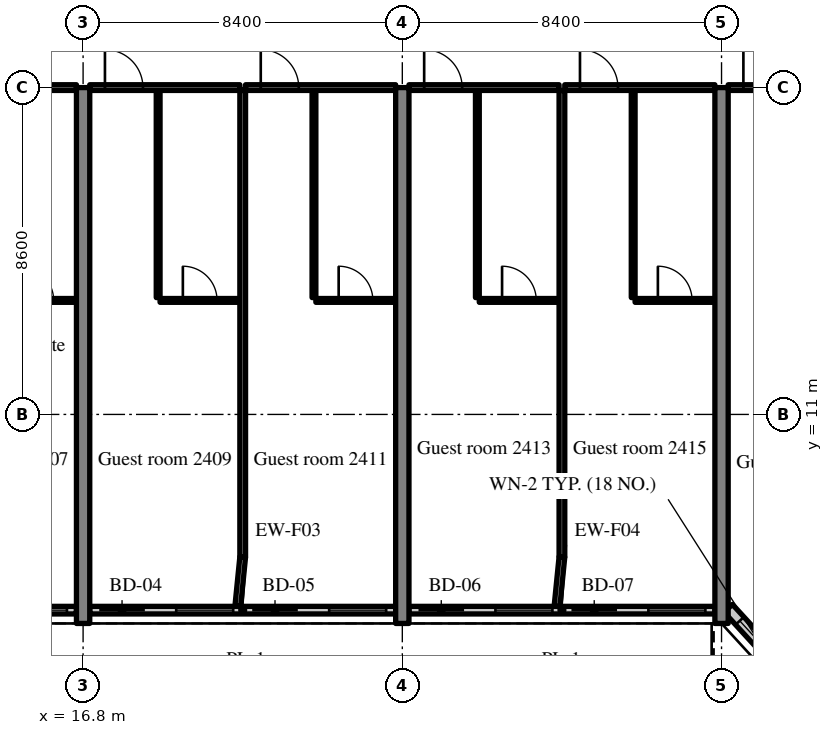
"""IFC4 building model, lengths in metres.
Left out: names, types, materials, properties, quantities, classifications, styles, units other than length and angle.
Written with IfcOpenShell. Run it as: python <this file> out.ifc"""

import sys

from ifc_helpers import new_model, si_unit, direction, frame, frame_2d, origin, place, context, subcontext, project, spatial, rectangle, extrude, source, transform, mapped, element, fill, save


model = new_model("IFC4")
c1 = context("Model", 3, precision=1e-05, world=origin(), true_north=direction((0.0, 1.0)))
c2 = subcontext(c1, "Body", "Model", "MODEL_VIEW")
j1 = project(units=[si_unit("LENGTHUNIT", "METRE"), si_unit("PLANEANGLEUNIT", "RADIAN")], contexts=[c1])
p1 = place(None, origin())
s1 = spatial("IfcSite", under=j1, at=p1, CompositionType="ELEMENT")
p2 = place(p1, origin())
s2 = spatial("IfcBuilding", under=s1, at=p2, CompositionType="ELEMENT")
p3 = place(p2, frame((0.0, 0.0, 102.8)))
s3 = spatial("IfcBuildingStorey", under=s2, at=p3, CompositionType="ELEMENT", Elevation=102.8)
m1 = source(origin(), c2, "Body", "SweptSolid", [
    extrude(rectangle(XDim=14.1, YDim=0.35, at=frame_2d((7.05, 0.0))), origin(), (0.0, 0.0, 1.0), 3.52),
])
for number, where, z_axis, x_axis in (
    (1, (16.8, 5.5, 0.0), (0.0, 0.0, 1.0), (0.0, 1.0, 0.0)),
    (2, (25.2, 5.5, 0.0), (0.0, 0.0, 1.0), (0.0, 1.0, 0.0)),
    (3, (33.6, 5.5, 0.0), (0.0, 0.0, 1.0), (0.0, 1.0, 0.0)),
):
    element("IfcWall", number, at=place(p3, frame(where, z_axis=z_axis, x_axis=x_axis)), inside=s3, PredefinedType="SHEAR", context=c2, shape_type="MappedRepresentation", body=[
        mapped(m1, transform((0.0, 0.0, 0.0), scale=1.0)),
    ])
m2 = source(origin(), c2, "Body", "SweptSolid", [
    extrude(rectangle(XDim=8.05, YDim=0.2, at=frame_2d((4.025, 0.0))), origin(), (0.0, 0.0, 1.0), 2.82),
])
p4 = place(p3, frame((8.575, 5.85, 0.0), z_axis=(0.0, 0.0, 1.0), x_axis=(1.0, 0.0, 0.0)))
e4 = element("IfcWall", 4, at=p4, inside=s3, PredefinedType="SOLIDWALL", context=c2, shape_type="MappedRepresentation", body=[
    mapped(m2, transform((0.0, 0.0, 0.0), scale=1.0)),
])
m3 = source(origin(), c2, "Body", "SweptSolid", [
    extrude(rectangle(XDim=1.2, YDim=2.4, at=frame_2d((0.6, 1.2))), frame((0.0, 0.11, 0.0), z_axis=(0.0, -1.0, 0.0), x_axis=(1.0, 0.0, 0.0)), (0.0, 0.0, 1.0), 0.22),
])
p5 = place(p4, frame((0.25, 0.0, 0.0)))
e5 = element("IfcOpeningElement", 5, at=p5, cuts=e4, PredefinedType="OPENING", context=c2, shape_type="MappedRepresentation", body=[
    mapped(m3, transform((0.0, 0.0, 0.0), scale=1.0)),
])
m4 = source(origin(), c2, "Body", "SweptSolid", [
    extrude(rectangle(XDim=1.5, YDim=1.5, at=frame_2d((0.75, 0.75))), frame((0.0, 0.11, 0.0), z_axis=(0.0, -1.0, 0.0), x_axis=(1.0, 0.0, 0.0)), (0.0, 0.0, 1.0), 0.22),
])
p6 = place(p4, frame((2.275, 0.0, 0.9)))
e6 = element("IfcOpeningElement", 6, at=p6, cuts=e4, PredefinedType="OPENING", context=c2, shape_type="MappedRepresentation", body=[
    mapped(m4, transform((0.0, 0.0, 0.0), scale=1.0)),
])
p7 = place(p4, frame((4.275, 0.0, 0.0)))
e7 = element("IfcOpeningElement", 7, at=p7, cuts=e4, PredefinedType="OPENING", context=c2, shape_type="MappedRepresentation", body=[
    mapped(m3, transform((0.0, 0.0, 0.0), scale=1.0)),
])
p8 = place(p4, frame((6.3, 0.0, 0.9)))
e8 = element("IfcOpeningElement", 8, at=p8, cuts=e4, PredefinedType="OPENING", context=c2, shape_type="MappedRepresentation", body=[
    mapped(m4, transform((0.0, 0.0, 0.0), scale=1.0)),
])
m5 = source(origin(), c2, "Body", "SweptSolid", [
    extrude(rectangle(XDim=8.05, YDim=0.2, at=frame_2d((4.025, 0.0))), origin(), (0.0, 0.0, 1.0), 2.82),
])
p9 = place(p3, frame((16.975, 5.85, 0.0), z_axis=(0.0, 0.0, 1.0), x_axis=(1.0, 0.0, 0.0)))
e9 = element("IfcWall", 9, at=p9, inside=s3, PredefinedType="SOLIDWALL", context=c2, shape_type="MappedRepresentation", body=[
    mapped(m5, transform((0.0, 0.0, 0.0), scale=1.0)),
])
p10 = place(p9, frame((0.25, 0.0, 0.0)))
e10 = element("IfcOpeningElement", 10, at=p10, cuts=e9, PredefinedType="OPENING", context=c2, shape_type="MappedRepresentation", body=[
    mapped(m3, transform((0.0, 0.0, 0.0), scale=1.0)),
])
p11 = place(p9, frame((2.275, 0.0, 0.9)))
e11 = element("IfcOpeningElement", 11, at=p11, cuts=e9, PredefinedType="OPENING", context=c2, shape_type="MappedRepresentation", body=[
    mapped(m4, transform((0.0, 0.0, 0.0), scale=1.0)),
])
p12 = place(p9, frame((4.275, 0.0, 0.0)))
e12 = element("IfcOpeningElement", 12, at=p12, cuts=e9, PredefinedType="OPENING", context=c2, shape_type="MappedRepresentation", body=[
    mapped(m3, transform((0.0, 0.0, 0.0), scale=1.0)),
])
p13 = place(p9, frame((6.3, 0.0, 0.9)))
e13 = element("IfcOpeningElement", 13, at=p13, cuts=e9, PredefinedType="OPENING", context=c2, shape_type="MappedRepresentation", body=[
    mapped(m4, transform((0.0, 0.0, 0.0), scale=1.0)),
])
p14 = place(p3, frame((25.375, 5.85, 0.0), z_axis=(0.0, 0.0, 1.0), x_axis=(1.0, 0.0, 0.0)))
e14 = element("IfcWall", 14, at=p14, inside=s3, PredefinedType="SOLIDWALL", context=c2, shape_type="MappedRepresentation", body=[
    mapped(m2, transform((0.0, 0.0, 0.0), scale=1.0)),
])
p15 = place(p14, frame((0.25, 0.0, 0.0)))
e15 = element("IfcOpeningElement", 15, at=p15, cuts=e14, PredefinedType="OPENING", context=c2, shape_type="MappedRepresentation", body=[
    mapped(m3, transform((0.0, 0.0, 0.0), scale=1.0)),
])
p16 = place(p14, frame((2.275, 0.0, 0.9)))
e16 = element("IfcOpeningElement", 16, at=p16, cuts=e14, PredefinedType="OPENING", context=c2, shape_type="MappedRepresentation", body=[
    mapped(m4, transform((0.0, 0.0, 0.0), scale=1.0)),
])
p17 = place(p14, frame((4.275, 0.0, 0.0)))
e17 = element("IfcOpeningElement", 17, at=p17, cuts=e14, PredefinedType="OPENING", context=c2, shape_type="MappedRepresentation", body=[
    mapped(m3, transform((0.0, 0.0, 0.0), scale=1.0)),
])
p18 = place(p14, frame((6.3, 0.0, 0.9)))
e18 = element("IfcOpeningElement", 18, at=p18, cuts=e14, PredefinedType="OPENING", context=c2, shape_type="MappedRepresentation", body=[
    mapped(m4, transform((0.0, 0.0, 0.0), scale=1.0)),
])
m6 = source(origin(), c2, "Body", "SweptSolid", [
    extrude(rectangle(XDim=2.398, YDim=0.3, at=frame_2d((1.199, 0.0))), origin(), (0.0, 0.0, 1.0), 3.52),
])
p19 = place(p3, frame((33.776, 5.9, 0.0), z_axis=(0.0, 0.0, 1.0), x_axis=(0.675374189419, -0.737475222815, 0.0)))
e19 = element("IfcWall", 19, at=p19, inside=s3, PredefinedType="SOLIDWALL", context=c2, shape_type="MappedRepresentation", body=[
    mapped(m6, transform((0.0, 0.0, 0.0), scale=1.0)),
])
m7 = source(origin(), c2, "Body", "SweptSolid", [
    extrude(rectangle(XDim=1.5, YDim=2.0, at=frame_2d((0.75, 1.0))), frame((0.0, 0.16, 0.0), z_axis=(0.0, -1.0, 0.0), x_axis=(1.0, 0.0, 0.0)), (0.0, 0.0, 1.0), 0.32),
])
p20 = place(p19, frame((0.449, 0.0, 0.9)))
e20 = element("IfcOpeningElement", 20, at=p20, cuts=e19, PredefinedType="OPENING", context=c2, shape_type="MappedRepresentation", body=[
    mapped(m7, transform((0.0, 0.0, 0.0), scale=1.0)),
])
m8 = source(origin(), c2, "Body", "SweptSolid", [
    extrude(rectangle(XDim=2.1, YDim=0.1, at=frame_2d((1.05, 0.0))), origin(), (0.0, 0.0, 1.0), 3.52),
])
p21 = place(p3, frame((14.525, 14.0, 0.0), z_axis=(0.0, 0.0, 1.0), x_axis=(1.0, 0.0, 0.0)))
e21 = element("IfcWall", 21, at=p21, inside=s3, PredefinedType="PARTITIONING", context=c2, shape_type="MappedRepresentation", body=[
    mapped(m8, transform((0.0, 0.0, 0.0), scale=1.0)),
])
m9 = source(origin(), c2, "Body", "SweptSolid", [
    extrude(rectangle(XDim=0.9, YDim=2.1, at=frame_2d((0.45, 1.05))), frame((0.0, 0.06, 0.0), z_axis=(0.0, -1.0, 0.0), x_axis=(1.0, 0.0, 0.0)), (0.0, 0.0, 1.0), 0.12),
])
p22 = place(p21, frame((0.6, 0.0, 0.0)))
e22 = element("IfcOpeningElement", 22, at=p22, cuts=e21, PredefinedType="OPENING", context=c2, shape_type="MappedRepresentation", body=[
    mapped(m9, transform((0.0, 0.0, 0.0), scale=1.0)),
])
m10 = source(origin(), c2, "Body", "SweptSolid", [
    extrude(rectangle(XDim=3.95, YDim=0.15, at=frame_2d((1.975, 0.0))), origin(), (0.0, 0.0, 1.0), 2.82),
])
p23 = place(p3, frame((12.675, 19.6, 0.0), z_axis=(0.0, 0.0, 1.0), x_axis=(1.0, 0.0, 0.0)))
e23 = element("IfcWall", 23, at=p23, inside=s3, PredefinedType="PARTITIONING", context=c2, shape_type="MappedRepresentation", body=[
    mapped(m10, transform((0.0, 0.0, 0.0), scale=1.0)),
])
m11 = source(origin(), c2, "Body", "SweptSolid", [
    extrude(rectangle(XDim=1.0, YDim=2.1, at=frame_2d((0.5, 1.05))), frame((0.0, 0.085, 0.0), z_axis=(0.0, -1.0, 0.0), x_axis=(1.0, 0.0, 0.0)), (0.0, 0.0, 1.0), 0.17),
])
p24 = place(p23, frame((0.4, 0.0, 0.0)))
e24 = element("IfcOpeningElement", 24, at=p24, cuts=e23, PredefinedType="OPENING", context=c2, shape_type="MappedRepresentation", body=[
    mapped(m11, transform((0.0, 0.0, 0.0), scale=1.0)),
])
m12 = source(origin(), c2, "Body", "SweptSolid", [
    extrude(rectangle(XDim=5.45, YDim=0.1, at=frame_2d((2.725, 0.0))), origin(), (0.0, 0.0, 1.0), 3.52),
])
p25 = place(p3, frame((18.775, 14.075, 0.0), z_axis=(0.0, 0.0, 1.0), x_axis=(0.0, 1.0, 0.0)))
e25 = element("IfcWall", 25, at=p25, inside=s3, PredefinedType="PARTITIONING", context=c2, shape_type="MappedRepresentation", body=[
    mapped(m12, transform((0.0, 0.0, 0.0), scale=1.0)),
])
p26 = place(p3, frame((18.825, 14.0, 0.0), z_axis=(0.0, 0.0, 1.0), x_axis=(1.0, 0.0, 0.0)))
e26 = element("IfcWall", 26, at=p26, inside=s3, PredefinedType="PARTITIONING", context=c2, shape_type="MappedRepresentation", body=[
    mapped(m8, transform((0.0, 0.0, 0.0), scale=1.0)),
])
p27 = place(p26, frame((0.6, 0.0, 0.0)))
e27 = element("IfcOpeningElement", 27, at=p27, cuts=e26, PredefinedType="OPENING", context=c2, shape_type="MappedRepresentation", body=[
    mapped(m9, transform((0.0, 0.0, 0.0), scale=1.0)),
])
p28 = place(p3, frame((16.975, 19.6, 0.0), z_axis=(0.0, 0.0, 1.0), x_axis=(1.0, 0.0, 0.0)))
e28 = element("IfcWall", 28, at=p28, inside=s3, PredefinedType="PARTITIONING", context=c2, shape_type="MappedRepresentation", body=[
    mapped(m10, transform((0.0, 0.0, 0.0), scale=1.0)),
])
p29 = place(p28, frame((0.4, 0.0, 0.0)))
e29 = element("IfcOpeningElement", 29, at=p29, cuts=e28, PredefinedType="OPENING", context=c2, shape_type="MappedRepresentation", body=[
    mapped(m11, transform((0.0, 0.0, 0.0), scale=1.0)),
])
p30 = place(p3, frame((22.875, 14.075, 0.0), z_axis=(0.0, 0.0, 1.0), x_axis=(0.0, 1.0, 0.0)))
e30 = element("IfcWall", 30, at=p30, inside=s3, PredefinedType="PARTITIONING", context=c2, shape_type="MappedRepresentation", body=[
    mapped(m12, transform((0.0, 0.0, 0.0), scale=1.0)),
])
m13 = source(origin(), c2, "Body", "SweptSolid", [
    extrude(rectangle(XDim=2.1, YDim=0.1, at=frame_2d((1.05, 0.0))), origin(), (0.0, 0.0, 1.0), 3.52),
])
p31 = place(p3, frame((22.925, 14.0, 0.0), z_axis=(0.0, 0.0, 1.0), x_axis=(1.0, 0.0, 0.0)))
e31 = element("IfcWall", 31, at=p31, inside=s3, PredefinedType="PARTITIONING", context=c2, shape_type="MappedRepresentation", body=[
    mapped(m13, transform((0.0, 0.0, 0.0), scale=1.0)),
])
p32 = place(p31, frame((0.6, 0.0, 0.0)))
e32 = element("IfcOpeningElement", 32, at=p32, cuts=e31, PredefinedType="OPENING", context=c2, shape_type="MappedRepresentation", body=[
    mapped(m9, transform((0.0, 0.0, 0.0), scale=1.0)),
])
p33 = place(p3, frame((21.075, 19.6, 0.0), z_axis=(0.0, 0.0, 1.0), x_axis=(1.0, 0.0, 0.0)))
e33 = element("IfcWall", 33, at=p33, inside=s3, PredefinedType="PARTITIONING", context=c2, shape_type="MappedRepresentation", body=[
    mapped(m10, transform((0.0, 0.0, 0.0), scale=1.0)),
])
p34 = place(p33, frame((0.4, 0.0, 0.0)))
e34 = element("IfcOpeningElement", 34, at=p34, cuts=e33, PredefinedType="OPENING", context=c2, shape_type="MappedRepresentation", body=[
    mapped(m11, transform((0.0, 0.0, 0.0), scale=1.0)),
])
m14 = source(origin(), c2, "Body", "SweptSolid", [
    extrude(rectangle(XDim=12.275, YDim=0.15, at=frame_2d((6.137, 0.0))), origin(), (0.0, 0.0, 1.0), 3.52),
])
p35 = place(p3, frame((21.0, 7.25, 0.0), z_axis=(0.0, 0.0, 1.0), x_axis=(0.0, 1.0, 0.0)))
e35 = element("IfcWall", 35, at=p35, inside=s3, PredefinedType="PARTITIONING", context=c2, shape_type="MappedRepresentation", body=[
    mapped(m14, transform((0.0, 0.0, 0.0), scale=1.0)),
])
p36 = place(p3, frame((27.175, 14.075, 0.0), z_axis=(0.0, 0.0, 1.0), x_axis=(0.0, 1.0, 0.0)))
e36 = element("IfcWall", 36, at=p36, inside=s3, PredefinedType="PARTITIONING", context=c2, shape_type="MappedRepresentation", body=[
    mapped(m12, transform((0.0, 0.0, 0.0), scale=1.0)),
])
p37 = place(p3, frame((27.225, 14.0, 0.0), z_axis=(0.0, 0.0, 1.0), x_axis=(1.0, 0.0, 0.0)))
e37 = element("IfcWall", 37, at=p37, inside=s3, PredefinedType="PARTITIONING", context=c2, shape_type="MappedRepresentation", body=[
    mapped(m13, transform((0.0, 0.0, 0.0), scale=1.0)),
])
p38 = place(p37, frame((0.6, 0.0, 0.0)))
e38 = element("IfcOpeningElement", 38, at=p38, cuts=e37, PredefinedType="OPENING", context=c2, shape_type="MappedRepresentation", body=[
    mapped(m9, transform((0.0, 0.0, 0.0), scale=1.0)),
])
p39 = place(p3, frame((25.375, 19.6, 0.0), z_axis=(0.0, 0.0, 1.0), x_axis=(1.0, 0.0, 0.0)))
e39 = element("IfcWall", 39, at=p39, inside=s3, PredefinedType="PARTITIONING", context=c2, shape_type="MappedRepresentation", body=[
    mapped(m10, transform((0.0, 0.0, 0.0), scale=1.0)),
])
p40 = place(p39, frame((0.4, 0.0, 0.0)))
e40 = element("IfcOpeningElement", 40, at=p40, cuts=e39, PredefinedType="OPENING", context=c2, shape_type="MappedRepresentation", body=[
    mapped(m11, transform((0.0, 0.0, 0.0), scale=1.0)),
])
p41 = place(p3, frame((31.275, 14.075, 0.0), z_axis=(0.0, 0.0, 1.0), x_axis=(0.0, 1.0, 0.0)))
e41 = element("IfcWall", 41, at=p41, inside=s3, PredefinedType="PARTITIONING", context=c2, shape_type="MappedRepresentation", body=[
    mapped(m12, transform((0.0, 0.0, 0.0), scale=1.0)),
])
p42 = place(p3, frame((31.325, 14.0, 0.0), z_axis=(0.0, 0.0, 1.0), x_axis=(1.0, 0.0, 0.0)))
e42 = element("IfcWall", 42, at=p42, inside=s3, PredefinedType="PARTITIONING", context=c2, shape_type="MappedRepresentation", body=[
    mapped(m8, transform((0.0, 0.0, 0.0), scale=1.0)),
])
p43 = place(p42, frame((0.6, 0.0, 0.0)))
e43 = element("IfcOpeningElement", 43, at=p43, cuts=e42, PredefinedType="OPENING", context=c2, shape_type="MappedRepresentation", body=[
    mapped(m9, transform((0.0, 0.0, 0.0), scale=1.0)),
])
p44 = place(p3, frame((29.475, 19.6, 0.0), z_axis=(0.0, 0.0, 1.0), x_axis=(1.0, 0.0, 0.0)))
e44 = element("IfcWall", 44, at=p44, inside=s3, PredefinedType="PARTITIONING", context=c2, shape_type="MappedRepresentation", body=[
    mapped(m10, transform((0.0, 0.0, 0.0), scale=1.0)),
])
p45 = place(p44, frame((0.4, 0.0, 0.0)))
e45 = element("IfcOpeningElement", 45, at=p45, cuts=e44, PredefinedType="OPENING", context=c2, shape_type="MappedRepresentation", body=[
    mapped(m11, transform((0.0, 0.0, 0.0), scale=1.0)),
])
p46 = place(p3, frame((29.4, 7.25, 0.0), z_axis=(0.0, 0.0, 1.0), x_axis=(0.0, 1.0, 0.0)))
e46 = element("IfcWall", 46, at=p46, inside=s3, PredefinedType="PARTITIONING", context=c2, shape_type="MappedRepresentation", body=[
    mapped(m14, transform((0.0, 0.0, 0.0), scale=1.0)),
])
m15 = source(origin(), c2, "Body", "SweptSolid", [
    extrude(rectangle(XDim=3.95, YDim=0.15, at=frame_2d((1.975, 0.0))), origin(), (0.0, 0.0, 1.0), 2.82),
])
p47 = place(p3, frame((33.775, 19.6, 0.0), z_axis=(0.0, 0.0, 1.0), x_axis=(1.0, 0.0, 0.0)))
e47 = element("IfcWall", 47, at=p47, inside=s3, PredefinedType="PARTITIONING", context=c2, shape_type="MappedRepresentation", body=[
    mapped(m15, transform((0.0, 0.0, 0.0), scale=1.0)),
])
p48 = place(p47, frame((0.4, 0.0, 0.0)))
e48 = element("IfcOpeningElement", 48, at=p48, cuts=e47, PredefinedType="OPENING", context=c2, shape_type="MappedRepresentation", body=[
    mapped(m11, transform((0.0, 0.0, 0.0), scale=1.0)),
])
m16 = source(origin(), c2, "Body", "SweptSolid", [
    extrude(rectangle(XDim=1.307, YDim=0.15, at=frame_2d((0.653, 0.0))), origin(), (0.0, 0.0, 1.0), 3.52),
])
for number, where, z_axis, x_axis in (
    (49, (20.87, 5.95, 0.0), (0.0, 0.0, 1.0), (0.099, 0.995, 0.0)),
    (50, (29.27, 5.95, 0.0), (0.0, 0.0, 1.0), (0.099, 0.995, 0.0)),
):
    element("IfcWall", number, at=place(p3, frame(where, z_axis=z_axis, x_axis=x_axis)), inside=s3, PredefinedType="PARTITIONING", context=c2, shape_type="MappedRepresentation", body=[
        mapped(m16, transform((0.0, 0.0, 0.0), scale=1.0)),
    ])
m17 = source(origin(), c2, "Body", "SweptSolid", [
    extrude(rectangle(XDim=1.5, YDim=1.5, at=frame_2d((0.75, 0.75))), frame((0.0, 0.03, 0.0), z_axis=(0.0, -1.0, 0.0), x_axis=(1.0, 0.0, 0.0)), (0.0, 0.0, 1.0), 0.06),
])
p49 = place(p8, origin())
e51 = element("IfcWindow", 51, at=p49, inside=s3, PartitioningType="SINGLE_PANEL", PredefinedType="WINDOW", context=c2, shape_type="MappedRepresentation", body=[
    mapped(m17, transform((0.0, 0.0, 0.0), scale=1.0)),
])
fill(e8, e51)
m18 = source(origin(), c2, "Body", "SweptSolid", [
    extrude(rectangle(XDim=1.2, YDim=2.4, at=frame_2d((0.6, 1.2))), frame((0.0, 0.025, 0.0), z_axis=(0.0, -1.0, 0.0), x_axis=(1.0, 0.0, 0.0)), (0.0, 0.0, 1.0), 0.05),
])
p50 = place(p10, origin())
e52 = element("IfcDoor", 52, at=p50, inside=s3, OperationType="SLIDING_TO_RIGHT", PredefinedType="DOOR", context=c2, shape_type="MappedRepresentation", body=[
    mapped(m18, transform((0.0, 0.0, 0.0), scale=1.0)),
])
fill(e10, e52)
p51 = place(p11, origin())
e53 = element("IfcWindow", 53, at=p51, inside=s3, PartitioningType="SINGLE_PANEL", PredefinedType="WINDOW", context=c2, shape_type="MappedRepresentation", body=[
    mapped(m17, transform((0.0, 0.0, 0.0), scale=1.0)),
])
fill(e11, e53)
p52 = place(p12, origin())
e54 = element("IfcDoor", 54, at=p52, inside=s3, OperationType="SLIDING_TO_LEFT", PredefinedType="DOOR", context=c2, shape_type="MappedRepresentation", body=[
    mapped(m18, transform((0.0, 0.0, 0.0), scale=1.0)),
])
fill(e12, e54)
p53 = place(p13, origin())
e55 = element("IfcWindow", 55, at=p53, inside=s3, PartitioningType="SINGLE_PANEL", PredefinedType="WINDOW", context=c2, shape_type="MappedRepresentation", body=[
    mapped(m17, transform((0.0, 0.0, 0.0), scale=1.0)),
])
fill(e13, e55)
p54 = place(p15, origin())
e56 = element("IfcDoor", 56, at=p54, inside=s3, OperationType="SLIDING_TO_RIGHT", PredefinedType="DOOR", context=c2, shape_type="MappedRepresentation", body=[
    mapped(m18, transform((0.0, 0.0, 0.0), scale=1.0)),
])
fill(e15, e56)
p55 = place(p16, origin())
e57 = element("IfcWindow", 57, at=p55, inside=s3, PartitioningType="SINGLE_PANEL", PredefinedType="WINDOW", context=c2, shape_type="MappedRepresentation", body=[
    mapped(m17, transform((0.0, 0.0, 0.0), scale=1.0)),
])
fill(e16, e57)
p56 = place(p17, origin())
e58 = element("IfcDoor", 58, at=p56, inside=s3, OperationType="SLIDING_TO_LEFT", PredefinedType="DOOR", context=c2, shape_type="MappedRepresentation", body=[
    mapped(m18, transform((0.0, 0.0, 0.0), scale=1.0)),
])
fill(e17, e58)
p57 = place(p18, origin())
e59 = element("IfcWindow", 59, at=p57, inside=s3, PartitioningType="SINGLE_PANEL", PredefinedType="WINDOW", context=c2, shape_type="MappedRepresentation", body=[
    mapped(m17, transform((0.0, 0.0, 0.0), scale=1.0)),
])
fill(e18, e59)
m19 = source(origin(), c2, "Body", "SweptSolid", [
    extrude(rectangle(XDim=1.5, YDim=2.0, at=frame_2d((0.75, 1.0))), frame((0.0, 0.03, 0.0), z_axis=(0.0, -1.0, 0.0), x_axis=(1.0, 0.0, 0.0)), (0.0, 0.0, 1.0), 0.06),
])
p58 = place(p20, origin())
e60 = element("IfcWindow", 60, at=p58, inside=s3, PartitioningType="SINGLE_PANEL", PredefinedType="WINDOW", context=c2, shape_type="MappedRepresentation", body=[
    mapped(m19, transform((0.0, 0.0, 0.0), scale=1.0)),
])
fill(e20, e60)
m20 = source(origin(), c2, "Body", "SweptSolid", [
    extrude(rectangle(XDim=0.9, YDim=2.1, at=frame_2d((0.45, 1.05))), frame((0.0, 0.025, 0.0), z_axis=(0.0, -1.0, 0.0), x_axis=(1.0, 0.0, 0.0)), (0.0, 0.0, 1.0), 0.05),
])
p59 = place(p22, origin())
e61 = element("IfcDoor", 61, at=p59, inside=s3, OperationType="SINGLE_SWING_LEFT", PredefinedType="DOOR", context=c2, shape_type="MappedRepresentation", body=[
    mapped(m20, transform((0.0, 0.0, 0.0), scale=1.0)),
])
fill(e22, e61)
p60 = place(p27, origin())
e62 = element("IfcDoor", 62, at=p60, inside=s3, OperationType="SINGLE_SWING_LEFT", PredefinedType="DOOR", context=c2, shape_type="MappedRepresentation", body=[
    mapped(m20, transform((0.0, 0.0, 0.0), scale=1.0)),
])
fill(e27, e62)
m21 = source(origin(), c2, "Body", "SweptSolid", [
    extrude(rectangle(XDim=1.0, YDim=2.1, at=frame_2d((0.5, 1.05))), frame((0.0, 0.025, 0.0), z_axis=(0.0, -1.0, 0.0), x_axis=(1.0, 0.0, 0.0)), (0.0, 0.0, 1.0), 0.05),
])
p61 = place(p29, origin())
e63 = element("IfcDoor", 63, at=p61, inside=s3, OperationType="SINGLE_SWING_LEFT", PredefinedType="DOOR", context=c2, shape_type="MappedRepresentation", body=[
    mapped(m21, transform((0.0, 0.0, 0.0), scale=1.0)),
])
fill(e29, e63)
p62 = place(p32, origin())
e64 = element("IfcDoor", 64, at=p62, inside=s3, OperationType="SINGLE_SWING_LEFT", PredefinedType="DOOR", context=c2, shape_type="MappedRepresentation", body=[
    mapped(m20, transform((0.0, 0.0, 0.0), scale=1.0)),
])
fill(e32, e64)
p63 = place(p34, origin())
e65 = element("IfcDoor", 65, at=p63, inside=s3, OperationType="SINGLE_SWING_LEFT", PredefinedType="DOOR", context=c2, shape_type="MappedRepresentation", body=[
    mapped(m21, transform((0.0, 0.0, 0.0), scale=1.0)),
])
fill(e34, e65)
p64 = place(p38, origin())
e66 = element("IfcDoor", 66, at=p64, inside=s3, OperationType="SINGLE_SWING_LEFT", PredefinedType="DOOR", context=c2, shape_type="MappedRepresentation", body=[
    mapped(m20, transform((0.0, 0.0, 0.0), scale=1.0)),
])
fill(e38, e66)
p65 = place(p40, origin())
e67 = element("IfcDoor", 67, at=p65, inside=s3, OperationType="SINGLE_SWING_LEFT", PredefinedType="DOOR", context=c2, shape_type="MappedRepresentation", body=[
    mapped(m21, transform((0.0, 0.0, 0.0), scale=1.0)),
])
fill(e40, e67)
p66 = place(p43, origin())
e68 = element("IfcDoor", 68, at=p66, inside=s3, OperationType="SINGLE_SWING_LEFT", PredefinedType="DOOR", context=c2, shape_type="MappedRepresentation", body=[
    mapped(m20, transform((0.0, 0.0, 0.0), scale=1.0)),
])
fill(e43, e68)
p67 = place(p45, origin())
e69 = element("IfcDoor", 69, at=p67, inside=s3, OperationType="SINGLE_SWING_LEFT", PredefinedType="DOOR", context=c2, shape_type="MappedRepresentation", body=[
    mapped(m21, transform((0.0, 0.0, 0.0), scale=1.0)),
])
fill(e45, e69)
p68 = place(p48, origin())
e70 = element("IfcDoor", 70, at=p68, inside=s3, OperationType="SINGLE_SWING_LEFT", PredefinedType="DOOR", context=c2, shape_type="MappedRepresentation", body=[
    mapped(m21, transform((0.0, 0.0, 0.0), scale=1.0)),
])
fill(e48, e70)
save(model, sys.argv[1])
